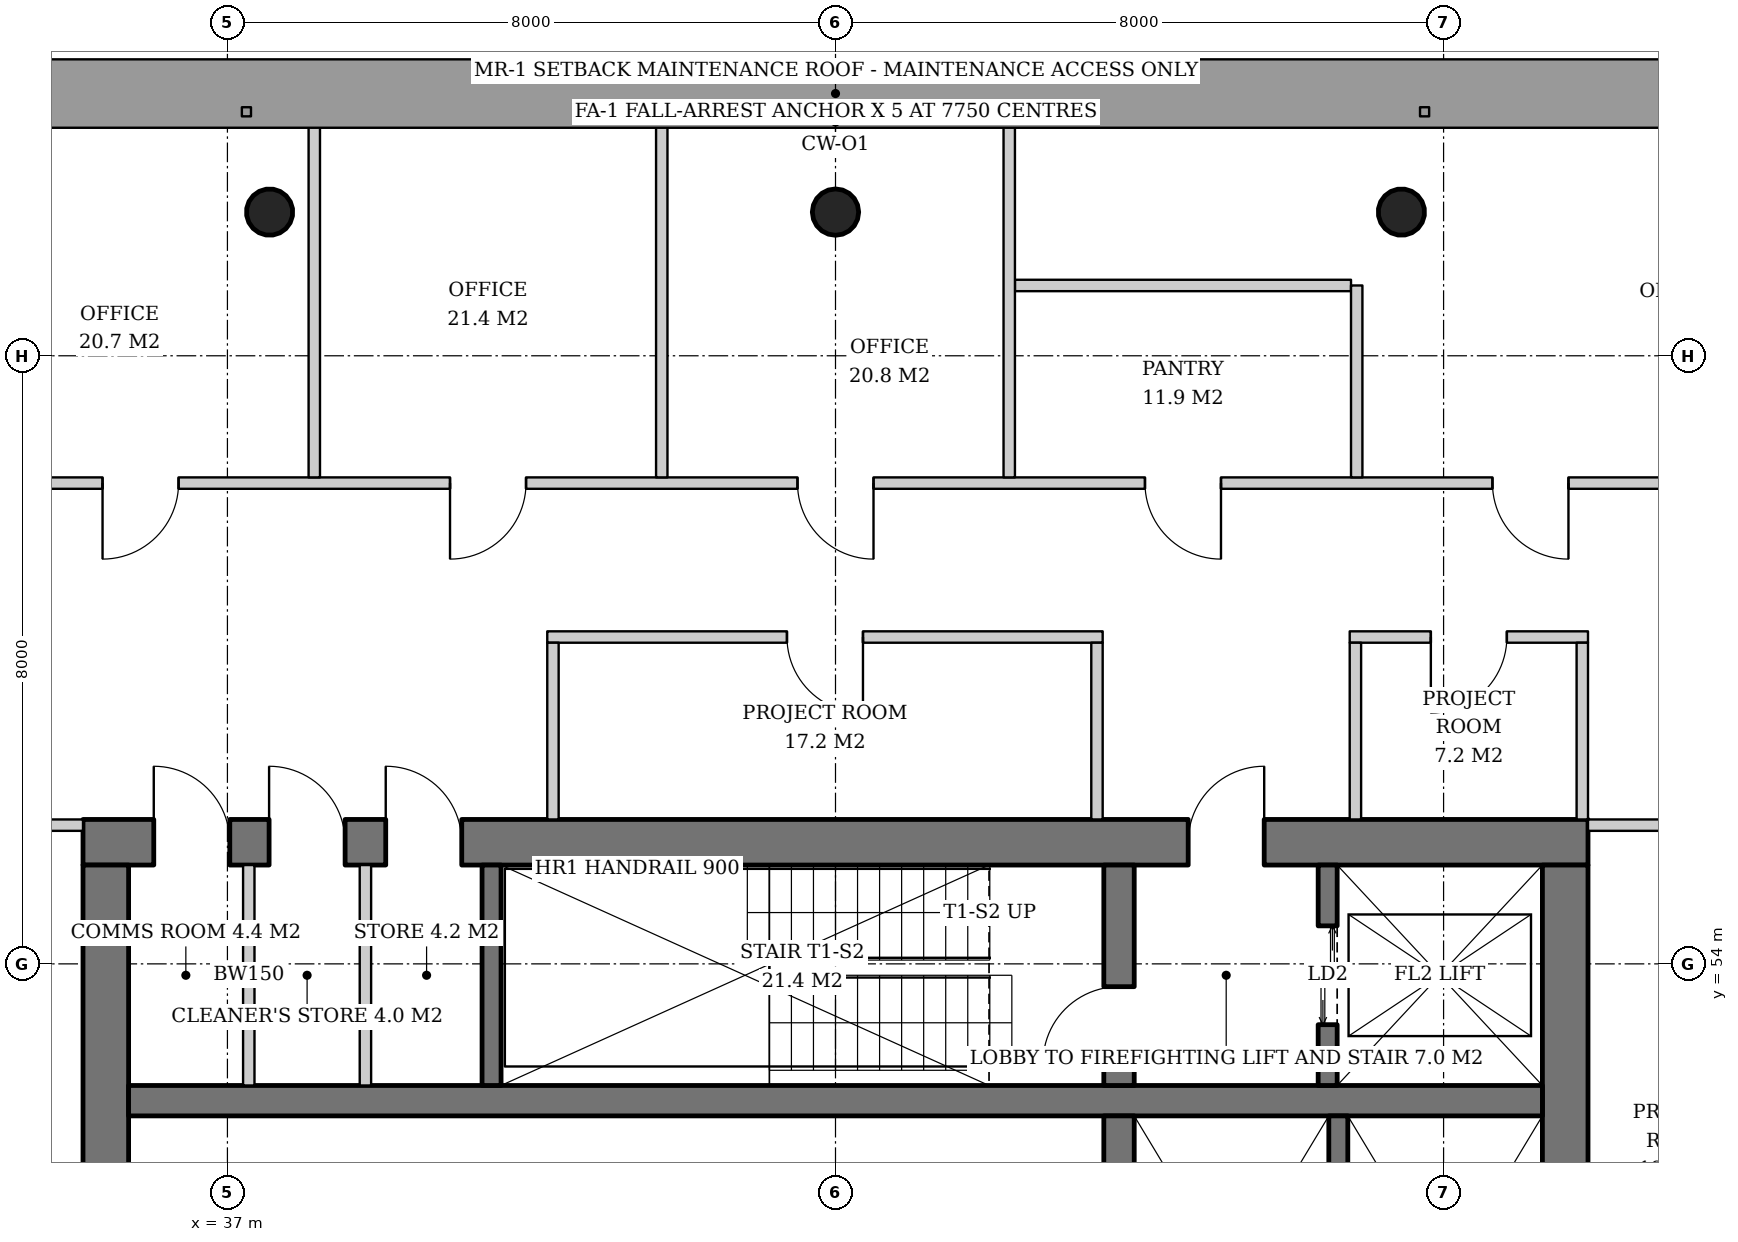
"""IFC4 building model, lengths in metres.
Left out: names, types, materials, properties, quantities, classifications, styles, units other than length and angle.
Written with IfcOpenShell. Run it as: python <this file> out.ifc"""

import sys

from ifc_helpers import new_model, si_unit, direction, frame, frame_2d, origin, origin_2d, place, context, subcontext, project, spatial, rectangle, hollow_circle, extrude, element, fill, save


model = new_model("IFC4")
c1 = context("Model", 3, precision=1e-05, world=origin(), true_north=direction((0.0, 1.0)))
c2 = subcontext(c1, "Body", "Model", "MODEL_VIEW")
j1 = project(units=[si_unit("LENGTHUNIT", "METRE"), si_unit("PLANEANGLEUNIT", "RADIAN")], contexts=[c1])
p1 = place(None, origin())
s1 = spatial("IfcSite", under=j1, at=p1, CompositionType="ELEMENT")
p2 = place(p1, origin())
s2 = spatial("IfcBuilding", under=s1, at=p2, CompositionType="ELEMENT")
p3 = place(p2, frame((0.0, 0.0, 211.0)))
s3 = spatial("IfcBuildingStorey", under=s2, at=p3, CompositionType="ELEMENT", Elevation=211.0)
p4 = place(p3, frame((52.464, 63.928, 0.0), z_axis=(-0.015987237665, -0.031910269556, 0.999362868496), x_axis=(0.894067115991, -0.447933021895, 0.0)))
e1 = element("IfcColumn", 1, at=p4, inside=s3, PredefinedType="COLUMN", context=c2, shape_type="SweptSolid", body=[
    extrude(hollow_circle(Radius=0.305, WallThickness=0.025, at=origin_2d()), origin(), (0.0, 0.0, 1.0), 3.802),
])
p5 = place(p3, frame((45.0, 63.928, 0.0), z_axis=(0.0, -0.031914348339, 0.999490607445), x_axis=(1.0, 0.0, 0.0)))
e2 = element("IfcColumn", 2, at=p5, inside=s3, PredefinedType="COLUMN", context=c2, shape_type="SweptSolid", body=[
    extrude(hollow_circle(Radius=0.305, WallThickness=0.025, at=origin_2d()), origin(), (0.0, 0.0, 1.0), 3.802),
])
p6 = place(p3, frame((37.536, 63.928, 0.0), z_axis=(0.015987237665, -0.031910269556, 0.999362868496), x_axis=(0.894067115991, 0.447933021895, 0.0)))
e3 = element("IfcColumn", 3, at=p6, inside=s3, PredefinedType="COLUMN", context=c2, shape_type="SweptSolid", body=[
    extrude(hollow_circle(Radius=0.305, WallThickness=0.025, at=origin_2d()), origin(), (0.0, 0.0, 1.0), 3.802),
])
p7 = place(p3, frame((35.1, 55.6, 0.0), z_axis=(0.0, 0.0, 1.0), x_axis=(1.0, 0.0, 0.0)))
e4 = element("IfcWall", 4, at=p7, inside=s3, PredefinedType="SHEAR", context=c2, shape_type="SweptSolid", body=[
    extrude(rectangle(XDim=19.8, YDim=0.6, at=frame_2d((9.9, 0.0))), origin(), (0.0, 0.0, 1.0), 3.8),
])
p8 = place(p7, frame((14.54, 0.0, 0.0)))
e5 = element("IfcOpeningElement", 5, at=p8, cuts=e4, PredefinedType="OPENING", context=c2, shape_type="SweptSolid", body=[
    extrude(rectangle(XDim=1.0, YDim=2.1, at=frame_2d((0.5, 1.05))), frame((0.0, 0.31, 0.0), z_axis=(0.0, -1.0, 0.0), x_axis=(1.0, 0.0, 0.0)), (0.0, 0.0, 1.0), 0.62),
])
p9 = place(p7, frame((0.931, 0.0, 0.0)))
e6 = element("IfcOpeningElement", 6, at=p9, cuts=e4, PredefinedType="OPENING", context=c2, shape_type="SweptSolid", body=[
    extrude(rectangle(XDim=1.0, YDim=2.1, at=frame_2d((0.5, 1.05))), frame((0.0, 0.31, 0.0), z_axis=(0.0, -1.0, 0.0), x_axis=(1.0, 0.0, 0.0)), (0.0, 0.0, 1.0), 0.62),
])
p10 = place(p7, frame((2.448, 0.0, 0.0)))
e7 = element("IfcOpeningElement", 7, at=p10, cuts=e4, PredefinedType="OPENING", context=c2, shape_type="SweptSolid", body=[
    extrude(rectangle(XDim=1.0, YDim=2.1, at=frame_2d((0.5, 1.05))), frame((0.0, 0.31, 0.0), z_axis=(0.0, -1.0, 0.0), x_axis=(1.0, 0.0, 0.0)), (0.0, 0.0, 1.0), 0.62),
])
p11 = place(p7, frame((3.983, 0.0, 0.0)))
e8 = element("IfcOpeningElement", 8, at=p11, cuts=e4, PredefinedType="OPENING", context=c2, shape_type="SweptSolid", body=[
    extrude(rectangle(XDim=1.0, YDim=2.1, at=frame_2d((0.5, 1.05))), frame((0.0, 0.31, 0.0), z_axis=(0.0, -1.0, 0.0), x_axis=(1.0, 0.0, 0.0)), (0.0, 0.0, 1.0), 0.62),
])
p12 = place(p3, frame((35.4, 36.7, 0.0), z_axis=(0.0, 0.0, 1.0), x_axis=(0.0, 1.0, 0.0)))
e9 = element("IfcWall", 9, at=p12, inside=s3, PredefinedType="SHEAR", context=c2, shape_type="SweptSolid", body=[
    extrude(rectangle(XDim=18.6, YDim=0.6, at=frame_2d((9.3, 0.0))), origin(), (0.0, 0.0, 1.0), 3.8),
])
p13 = place(p12, frame((8.4, 0.0, 0.0)))
e10 = element("IfcOpeningElement", 10, at=p13, cuts=e9, PredefinedType="OPENING", context=c2, shape_type="SweptSolid", body=[
    extrude(rectangle(XDim=1.8, YDim=2.4, at=frame_2d((0.9, 1.2))), frame((0.0, 0.31, 0.0), z_axis=(0.0, -1.0, 0.0), x_axis=(1.0, 0.0, 0.0)), (0.0, 0.0, 1.0), 0.62),
])
p14 = place(p3, frame((54.6, 36.7, 0.0), z_axis=(0.0, 0.0, 1.0), x_axis=(0.0, 1.0, 0.0)))
e11 = element("IfcWall", 11, at=p14, inside=s3, PredefinedType="SHEAR", context=c2, shape_type="SweptSolid", body=[
    extrude(rectangle(XDim=18.6, YDim=0.6, at=frame_2d((9.3, 0.0))), origin(), (0.0, 0.0, 1.0), 3.8),
])
p15 = place(p14, frame((8.4, 0.0, 0.0)))
e12 = element("IfcOpeningElement", 12, at=p15, cuts=e11, PredefinedType="OPENING", context=c2, shape_type="SweptSolid", body=[
    extrude(rectangle(XDim=1.8, YDim=2.4, at=frame_2d((0.9, 1.2))), frame((0.0, 0.31, 0.0), z_axis=(0.0, -1.0, 0.0), x_axis=(1.0, 0.0, 0.0)), (0.0, 0.0, 1.0), 0.62),
])
p16 = place(p3, frame((35.7, 52.2, 0.0), z_axis=(0.0, 0.0, 1.0), x_axis=(1.0, 0.0, 0.0)))
e13 = element("IfcWall", 13, at=p16, inside=s3, PredefinedType="SHEAR", context=c2, shape_type="SweptSolid", body=[
    extrude(rectangle(XDim=18.6, YDim=0.4, at=frame_2d((9.3, 0.0))), origin(), (0.0, 0.0, 1.0), 3.8),
])
p17 = place(p3, frame((48.73, 40.0, 0.0), z_axis=(0.0, 0.0, 1.0), x_axis=(0.0, 1.0, 0.0)))
e14 = element("IfcWall", 14, at=p17, inside=s3, PredefinedType="SHEAR", context=c2, shape_type="SweptSolid", body=[
    extrude(rectangle(XDim=12.0, YDim=0.4, at=frame_2d((6.0, 0.0))), origin(), (0.0, 0.0, 1.0), 3.8),
])
p18 = place(p3, frame((48.73, 52.4, 0.0), z_axis=(0.0, 0.0, 1.0), x_axis=(0.0, 1.0, 0.0)))
e15 = element("IfcWall", 15, at=p18, inside=s3, PredefinedType="SHEAR", context=c2, shape_type="SweptSolid", body=[
    extrude(rectangle(XDim=2.9, YDim=0.4, at=frame_2d((1.45, 0.0))), origin(), (0.0, 0.0, 1.0), 3.8),
])
p19 = place(p18, frame((0.3, 0.0, 0.0)))
e16 = element("IfcOpeningElement", 16, at=p19, cuts=e15, PredefinedType="OPENING", context=c2, shape_type="SweptSolid", body=[
    extrude(rectangle(XDim=1.0, YDim=2.1, at=frame_2d((0.5, 1.05))), frame((0.0, 0.21, 0.0), z_axis=(0.0, -1.0, 0.0), x_axis=(1.0, 0.0, 0.0)), (0.0, 0.0, 1.0), 0.42),
])
p20 = place(p3, frame((40.475, 52.4, 0.0), z_axis=(0.0, 0.0, 1.0), x_axis=(0.0, 1.0, 0.0)))
e17 = element("IfcWall", 17, at=p20, inside=s3, PredefinedType="SHEAR", context=c2, shape_type="SweptSolid", body=[
    extrude(rectangle(XDim=2.9, YDim=0.25, at=frame_2d((1.45, 0.0))), origin(), (0.0, 0.0, 1.0), 3.8),
])
p21 = place(p3, frame((51.475, 52.4, 0.0), z_axis=(0.0, 0.0, 1.0), x_axis=(0.0, 1.0, 0.0)))
e18 = element("IfcWall", 18, at=p21, inside=s3, PredefinedType="SHEAR", context=c2, shape_type="SweptSolid", body=[
    extrude(rectangle(XDim=2.9, YDim=0.25, at=frame_2d((1.45, 0.0))), origin(), (0.0, 0.0, 1.0), 3.8),
])
p22 = place(p21, frame((0.8, 0.0, 0.0)))
e19 = element("IfcOpeningElement", 19, at=p22, cuts=e18, PredefinedType="OPENING", context=c2, shape_type="SweptSolid", body=[
    extrude(rectangle(XDim=1.3, YDim=2.2, at=frame_2d((0.65, 1.1))), frame((0.0, 0.135, 0.0), z_axis=(0.0, -1.0, 0.0), x_axis=(1.0, 0.0, 0.0)), (0.0, 0.0, 1.0), 0.27),
])
p23 = place(p3, frame((51.615, 47.75, 0.0), z_axis=(0.0, 0.0, 1.0), x_axis=(0.0, 1.0, 0.0)))
e20 = element("IfcWall", 20, at=p23, inside=s3, PredefinedType="SHEAR", context=c2, shape_type="SweptSolid", body=[
    extrude(rectangle(XDim=4.25, YDim=0.25, at=frame_2d((2.125, 0.0))), origin(), (0.0, 0.0, 1.0), 3.8),
])
for number, where, z_axis, x_axis in (
    (21, (37.281, 52.4, 0.0), (0.0, 0.0, 1.0), (0.0, 1.0, 0.0)),
    (22, (38.815, 52.4, 0.0), (0.0, 0.0, 1.0), (0.0, 1.0, 0.0)),
):
    element("IfcWall", number, at=place(p3, frame(where, z_axis=z_axis, x_axis=x_axis)), inside=s3, PredefinedType="SOLIDWALL", context=c2, shape_type="SweptSolid", body=[
        extrude(rectangle(XDim=2.9, YDim=0.15, at=frame_2d((1.45, 0.0))), origin(), (0.0, 0.0, 1.0), 3.62),
    ])
p24 = place(p3, frame((54.9, 55.825, 0.0), z_axis=(0.0, 0.0, 1.0), x_axis=(1.0, 0.0, 0.0)))
e23 = element("IfcWall", 23, at=p24, inside=s3, PredefinedType="PARTITIONING", context=c2, shape_type="SweptSolid", body=[
    extrude(rectangle(XDim=2.325, YDim=0.15, at=frame_2d((1.163, 0.0))), origin(), (0.0, 0.0, 1.0), 3.62),
])
p25 = place(p3, frame((54.9, 58.3, 0.0), z_axis=(0.0, 0.0, 1.0), x_axis=(-1.0, 0.0, 0.0)))
e24 = element("IfcWall", 24, at=p25, inside=s3, PredefinedType="PARTITIONING", context=c2, shape_type="SweptSolid", body=[
    extrude(rectangle(XDim=3.135, YDim=0.15, at=frame_2d((1.567, 0.0))), origin(), (0.0, 0.0, 1.0), 2.92),
])
p26 = place(p25, frame((1.067, 0.0, 0.0)))
e25 = element("IfcOpeningElement", 25, at=p26, cuts=e24, PredefinedType="OPENING", context=c2, shape_type="SweptSolid", body=[
    extrude(rectangle(XDim=1.0, YDim=2.1, at=frame_2d((0.5, 1.05))), frame((0.0, 0.085, 0.0), z_axis=(0.0, -1.0, 0.0), x_axis=(1.0, 0.0, 0.0)), (0.0, 0.0, 1.0), 0.17),
])
p27 = place(p3, frame((54.825, 55.9, 0.0), z_axis=(0.0, 0.0, 1.0), x_axis=(0.0, 1.0, 0.0)))
e26 = element("IfcWall", 26, at=p27, inside=s3, PredefinedType="PARTITIONING", context=c2, shape_type="SweptSolid", body=[
    extrude(rectangle(XDim=2.325, YDim=0.15, at=frame_2d((1.163, 0.0))), origin(), (0.0, 0.0, 1.0), 2.867),
])
p28 = place(p3, frame((51.84, 55.9, 0.0), z_axis=(0.0, 0.0, 1.0), x_axis=(0.0, 1.0, 0.0)))
e27 = element("IfcWall", 27, at=p28, inside=s3, PredefinedType="PARTITIONING", context=c2, shape_type="SweptSolid", body=[
    extrude(rectangle(XDim=2.325, YDim=0.15, at=frame_2d((1.163, 0.0))), origin(), (0.0, 0.0, 1.0), 3.62),
])
p29 = place(p3, frame((48.515, 58.3, 0.0), z_axis=(0.0, 0.0, 1.0), x_axis=(-1.0, 0.0, 0.0)))
e28 = element("IfcWall", 28, at=p29, inside=s3, PredefinedType="PARTITIONING", context=c2, shape_type="SweptSolid", body=[
    extrude(rectangle(XDim=7.307, YDim=0.15, at=frame_2d((3.654, 0.0))), origin(), (0.0, 0.0, 1.0), 2.867),
])
p30 = place(p29, frame((3.154, 0.0, 0.0)))
e29 = element("IfcOpeningElement", 29, at=p30, cuts=e28, PredefinedType="OPENING", context=c2, shape_type="SweptSolid", body=[
    extrude(rectangle(XDim=1.0, YDim=2.1, at=frame_2d((0.5, 1.05))), frame((0.0, 0.085, 0.0), z_axis=(0.0, -1.0, 0.0), x_axis=(1.0, 0.0, 0.0)), (0.0, 0.0, 1.0), 0.17),
])
for number, where, z_axis, x_axis in (
    (30, (48.44, 55.9, 0.0), (0.0, 0.0, 1.0), (0.0, 1.0, 0.0)),
    (31, (41.283, 55.9, 0.0), (0.0, 0.0, 1.0), (0.0, 1.0, 0.0)),
):
    element("IfcWall", number, at=place(p3, frame(where, z_axis=z_axis, x_axis=x_axis)), inside=s3, PredefinedType="PARTITIONING", context=c2, shape_type="SweptSolid", body=[
        extrude(rectangle(XDim=2.325, YDim=0.15, at=frame_2d((1.163, 0.0))), origin(), (0.0, 0.0, 1.0), 3.62),
    ])
p31 = place(p3, frame((35.1, 55.825, 0.0), z_axis=(0.0, 0.0, 1.0), x_axis=(-1.0, 0.0, 0.0)))
e32 = element("IfcWall", 32, at=p31, inside=s3, PredefinedType="PARTITIONING", context=c2, shape_type="SweptSolid", body=[
    extrude(rectangle(XDim=2.325, YDim=0.15, at=frame_2d((1.163, 0.0))), origin(), (0.0, 0.0, 1.0), 2.867),
])
p32 = place(p3, frame((51.782, 62.925, 0.0), z_axis=(0.0, 0.0, 1.0), x_axis=(-1.0, 0.0, 0.0)))
e33 = element("IfcWall", 33, at=p32, inside=s3, PredefinedType="PARTITIONING", context=c2, shape_type="SweptSolid", body=[
    extrude(rectangle(XDim=4.422, YDim=0.15, at=frame_2d((2.211, 0.0))), origin(), (0.0, 0.0, 1.0), 2.867),
])
p33 = place(p3, frame((57.836, 60.325, 0.0), z_axis=(0.0, 0.0, 1.0), x_axis=(-1.0, 0.0, 0.0)))
e34 = element("IfcWall", 34, at=p33, inside=s3, PredefinedType="PARTITIONING", context=c2, shape_type="SweptSolid", body=[
    extrude(rectangle(XDim=25.671, YDim=0.15, at=frame_2d((12.836, 0.0))), origin(), (0.0, 0.0, 1.0), 2.867),
])
p34 = place(p33, frame((3.193, 0.0, 0.0)))
e35 = element("IfcOpeningElement", 35, at=p34, cuts=e34, PredefinedType="OPENING", context=c2, shape_type="SweptSolid", body=[
    extrude(rectangle(XDim=1.0, YDim=2.1, at=frame_2d((0.5, 1.05))), frame((0.0, 0.085, 0.0), z_axis=(0.0, -1.0, 0.0), x_axis=(1.0, 0.0, 0.0)), (0.0, 0.0, 1.0), 0.17),
])
p35 = place(p33, frame((7.764, 0.0, 0.0)))
e36 = element("IfcOpeningElement", 36, at=p35, cuts=e34, PredefinedType="OPENING", context=c2, shape_type="SweptSolid", body=[
    extrude(rectangle(XDim=1.0, YDim=2.1, at=frame_2d((0.5, 1.05))), frame((0.0, 0.085, 0.0), z_axis=(0.0, -1.0, 0.0), x_axis=(1.0, 0.0, 0.0)), (0.0, 0.0, 1.0), 0.17),
])
p36 = place(p33, frame((12.336, 0.0, 0.0)))
e37 = element("IfcOpeningElement", 37, at=p36, cuts=e34, PredefinedType="OPENING", context=c2, shape_type="SweptSolid", body=[
    extrude(rectangle(XDim=1.0, YDim=2.1, at=frame_2d((0.5, 1.05))), frame((0.0, 0.085, 0.0), z_axis=(0.0, -1.0, 0.0), x_axis=(1.0, 0.0, 0.0)), (0.0, 0.0, 1.0), 0.17),
])
p37 = place(p33, frame((16.907, 0.0, 0.0)))
e38 = element("IfcOpeningElement", 38, at=p37, cuts=e34, PredefinedType="OPENING", context=c2, shape_type="SweptSolid", body=[
    extrude(rectangle(XDim=1.0, YDim=2.1, at=frame_2d((0.5, 1.05))), frame((0.0, 0.085, 0.0), z_axis=(0.0, -1.0, 0.0), x_axis=(1.0, 0.0, 0.0)), (0.0, 0.0, 1.0), 0.17),
])
p38 = place(p33, frame((21.479, 0.0, 0.0)))
e39 = element("IfcOpeningElement", 39, at=p38, cuts=e34, PredefinedType="OPENING", context=c2, shape_type="SweptSolid", body=[
    extrude(rectangle(XDim=1.0, YDim=2.1, at=frame_2d((0.5, 1.05))), frame((0.0, 0.085, 0.0), z_axis=(0.0, -1.0, 0.0), x_axis=(1.0, 0.0, 0.0)), (0.0, 0.0, 1.0), 0.17),
])
p39 = place(p3, frame((51.857, 60.4, 0.0), z_axis=(0.0, 0.0, 1.0), x_axis=(0.0, 1.0, 0.0)))
e40 = element("IfcWall", 40, at=p39, inside=s3, PredefinedType="PARTITIONING", context=c2, shape_type="SweptSolid", body=[
    extrude(rectangle(XDim=2.525, YDim=0.15, at=frame_2d((1.263, 0.0))), origin(), (0.0, 0.0, 1.0), 3.62),
])
p40 = place(p3, frame((47.286, 60.4, 0.0), z_axis=(0.0, 0.0, 1.0), x_axis=(0.0, 1.0, 0.0)))
e41 = element("IfcWall", 41, at=p40, inside=s3, PredefinedType="PARTITIONING", context=c2, shape_type="SweptSolid", body=[
    extrude(rectangle(XDim=4.64, YDim=0.15, at=frame_2d((2.32, 0.0))), origin(), (0.0, 0.0, 1.0), 3.12),
])
p41 = place(p3, frame((42.714, 60.4, 0.0), z_axis=(0.0, 0.0, 1.0), x_axis=(0.0, 1.0, 0.0)))
e42 = element("IfcWall", 42, at=p41, inside=s3, PredefinedType="PARTITIONING", context=c2, shape_type="SweptSolid", body=[
    extrude(rectangle(XDim=4.64, YDim=0.15, at=frame_2d((2.32, 0.0))), origin(), (0.0, 0.0, 1.0), 2.867),
])
p42 = place(p3, frame((38.143, 60.4, 0.0), z_axis=(0.0, 0.0, 1.0), x_axis=(0.0, 1.0, 0.0)))
e43 = element("IfcWall", 43, at=p42, inside=s3, PredefinedType="PARTITIONING", context=c2, shape_type="SweptSolid", body=[
    extrude(rectangle(XDim=4.64, YDim=0.15, at=frame_2d((2.32, 0.0))), origin(), (0.0, 0.0, 1.0), 3.12),
])
p43 = place(p22, origin())
e44 = element("IfcDoor", 44, at=p43, inside=s3, OperationType="DOUBLE_DOOR_SLIDING", PredefinedType="DOOR", context=c2, shape_type="SweptSolid", body=[
    extrude(rectangle(XDim=1.3, YDim=2.2, at=frame_2d((0.65, 1.1))), frame((0.0, 0.025, 0.0), z_axis=(0.0, -1.0, 0.0), x_axis=(1.0, 0.0, 0.0)), (0.0, 0.0, 1.0), 0.05),
])
fill(e19, e44)
p44 = place(p19, origin())
e45 = element("IfcDoor", 45, at=p44, inside=s3, OperationType="SINGLE_SWING_LEFT", PredefinedType="DOOR", context=c2, shape_type="SweptSolid", body=[
    extrude(rectangle(XDim=1.0, YDim=2.1, at=frame_2d((0.5, 1.05))), frame((0.0, 0.025, 0.0), z_axis=(0.0, -1.0, 0.0), x_axis=(1.0, 0.0, 0.0)), (0.0, 0.0, 1.0), 0.05),
])
fill(e16, e45)
p45 = place(p8, origin())
e46 = element("IfcDoor", 46, at=p45, inside=s3, OperationType="SINGLE_SWING_RIGHT", PredefinedType="DOOR", context=c2, shape_type="SweptSolid", body=[
    extrude(rectangle(XDim=1.0, YDim=2.1, at=frame_2d((0.5, 1.05))), frame((0.0, 0.025, 0.0), z_axis=(0.0, -1.0, 0.0), x_axis=(1.0, 0.0, 0.0)), (0.0, 0.0, 1.0), 0.05),
])
fill(e5, e46)
p46 = place(p9, origin())
e47 = element("IfcDoor", 47, at=p46, inside=s3, OperationType="SINGLE_SWING_LEFT", PredefinedType="DOOR", context=c2, shape_type="SweptSolid", body=[
    extrude(rectangle(XDim=1.0, YDim=2.1, at=frame_2d((0.5, 1.05))), frame((0.0, -0.24, 0.0), z_axis=(0.0, -1.0, 0.0), x_axis=(1.0, 0.0, 0.0)), (0.0, 0.0, 1.0), 0.05),
])
fill(e6, e47)
p47 = place(p10, origin())
e48 = element("IfcDoor", 48, at=p47, inside=s3, OperationType="SINGLE_SWING_LEFT", PredefinedType="DOOR", context=c2, shape_type="SweptSolid", body=[
    extrude(rectangle(XDim=1.0, YDim=2.1, at=frame_2d((0.5, 1.05))), frame((0.0, -0.24, 0.0), z_axis=(0.0, -1.0, 0.0), x_axis=(1.0, 0.0, 0.0)), (0.0, 0.0, 1.0), 0.05),
])
fill(e7, e48)
p48 = place(p11, origin())
e49 = element("IfcDoor", 49, at=p48, inside=s3, OperationType="SINGLE_SWING_LEFT", PredefinedType="DOOR", context=c2, shape_type="SweptSolid", body=[
    extrude(rectangle(XDim=1.0, YDim=2.1, at=frame_2d((0.5, 1.05))), frame((0.0, -0.24, 0.0), z_axis=(0.0, -1.0, 0.0), x_axis=(1.0, 0.0, 0.0)), (0.0, 0.0, 1.0), 0.05),
])
fill(e8, e49)
p49 = place(p26, origin())
e50 = element("IfcDoor", 50, at=p49, inside=s3, OperationType="SINGLE_SWING_RIGHT", PredefinedType="DOOR", context=c2, shape_type="SweptSolid", body=[
    extrude(rectangle(XDim=1.0, YDim=2.1, at=frame_2d((0.5, 1.05))), frame((0.0, 0.025, 0.0), z_axis=(0.0, -1.0, 0.0), x_axis=(1.0, 0.0, 0.0)), (0.0, 0.0, 1.0), 0.05),
])
fill(e25, e50)
p50 = place(p30, origin())
e51 = element("IfcDoor", 51, at=p50, inside=s3, OperationType="SINGLE_SWING_LEFT", PredefinedType="DOOR", context=c2, shape_type="SweptSolid", body=[
    extrude(rectangle(XDim=1.0, YDim=2.1, at=frame_2d((0.5, 1.05))), frame((0.0, 0.025, 0.0), z_axis=(0.0, -1.0, 0.0), x_axis=(1.0, 0.0, 0.0)), (0.0, 0.0, 1.0), 0.05),
])
fill(e29, e51)
p51 = place(p34, origin())
e52 = element("IfcDoor", 52, at=p51, inside=s3, OperationType="SINGLE_SWING_LEFT", PredefinedType="DOOR", context=c2, shape_type="SweptSolid", body=[
    extrude(rectangle(XDim=1.0, YDim=2.1, at=frame_2d((0.5, 1.05))), frame((0.0, 0.025, 0.0), z_axis=(0.0, -1.0, 0.0), x_axis=(1.0, 0.0, 0.0)), (0.0, 0.0, 1.0), 0.05),
])
fill(e35, e52)
p52 = place(p35, origin())
e53 = element("IfcDoor", 53, at=p52, inside=s3, OperationType="SINGLE_SWING_LEFT", PredefinedType="DOOR", context=c2, shape_type="SweptSolid", body=[
    extrude(rectangle(XDim=1.0, YDim=2.1, at=frame_2d((0.5, 1.05))), frame((0.0, 0.025, 0.0), z_axis=(0.0, -1.0, 0.0), x_axis=(1.0, 0.0, 0.0)), (0.0, 0.0, 1.0), 0.05),
])
fill(e36, e53)
p53 = place(p36, origin())
e54 = element("IfcDoor", 54, at=p53, inside=s3, OperationType="SINGLE_SWING_LEFT", PredefinedType="DOOR", context=c2, shape_type="SweptSolid", body=[
    extrude(rectangle(XDim=1.0, YDim=2.1, at=frame_2d((0.5, 1.05))), frame((0.0, 0.025, 0.0), z_axis=(0.0, -1.0, 0.0), x_axis=(1.0, 0.0, 0.0)), (0.0, 0.0, 1.0), 0.05),
])
fill(e37, e54)
p54 = place(p37, origin())
e55 = element("IfcDoor", 55, at=p54, inside=s3, OperationType="SINGLE_SWING_RIGHT", PredefinedType="DOOR", context=c2, shape_type="SweptSolid", body=[
    extrude(rectangle(XDim=1.0, YDim=2.1, at=frame_2d((0.5, 1.05))), frame((0.0, 0.025, 0.0), z_axis=(0.0, -1.0, 0.0), x_axis=(1.0, 0.0, 0.0)), (0.0, 0.0, 1.0), 0.05),
])
fill(e38, e55)
p55 = place(p38, origin())
e56 = element("IfcDoor", 56, at=p55, inside=s3, OperationType="SINGLE_SWING_RIGHT", PredefinedType="DOOR", context=c2, shape_type="SweptSolid", body=[
    extrude(rectangle(XDim=1.0, YDim=2.1, at=frame_2d((0.5, 1.05))), frame((0.0, 0.025, 0.0), z_axis=(0.0, -1.0, 0.0), x_axis=(1.0, 0.0, 0.0)), (0.0, 0.0, 1.0), 0.05),
])
fill(e39, e56)
save(model, sys.argv[1])
